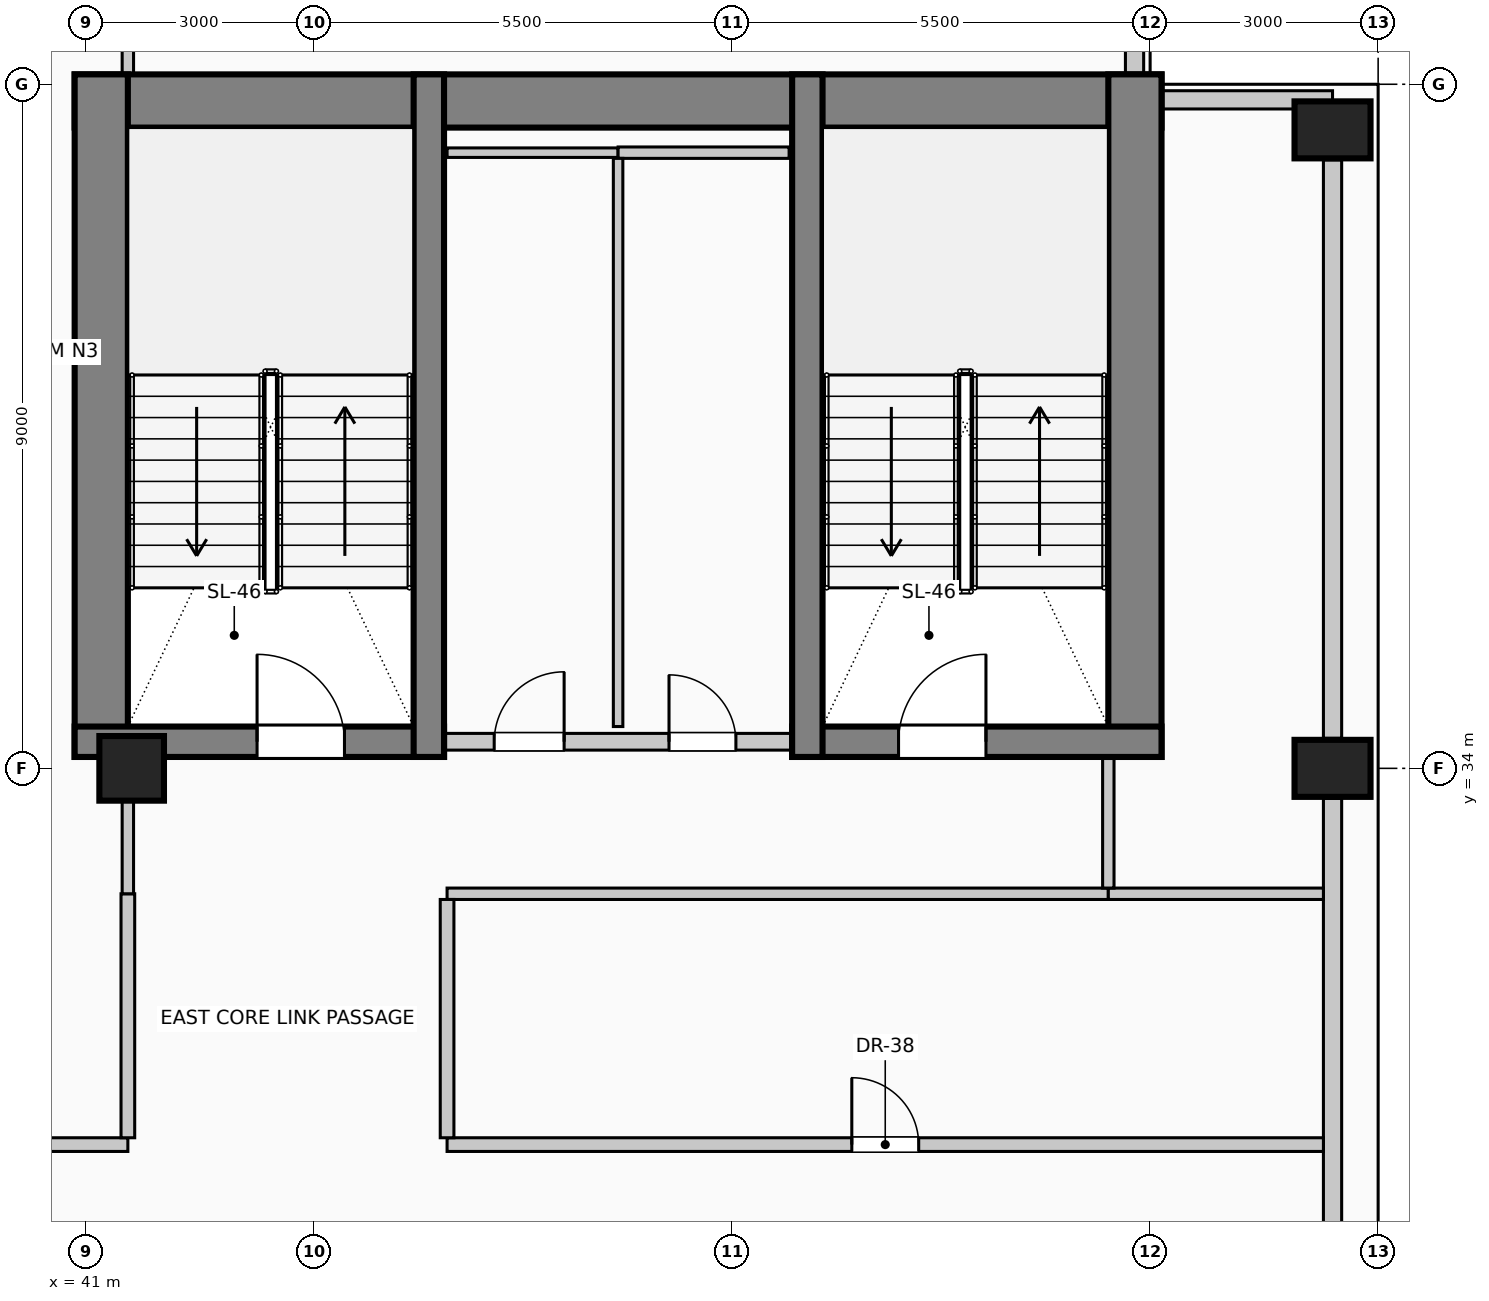
"""IFC4 building model, lengths in metres.
Left out: names, types, materials, properties, quantities, classifications, styles, units other than length and angle.
Written with IfcOpenShell. Run it as: python <this file> out.ifc"""

import sys

from ifc_helpers import new_model, si_unit, direction, frame, frame_2d, origin, origin_2d, place, context, subcontext, project, spatial, rectangle, circle, extrude, element, fill, save


model = new_model("IFC4")
c1 = context("Model", 3, precision=1e-05, world=origin(), true_north=direction((0.0, 1.0)))
c2 = subcontext(c1, "Body", "Model", "MODEL_VIEW")
j1 = project(units=[si_unit("LENGTHUNIT", "METRE"), si_unit("PLANEANGLEUNIT", "RADIAN")], contexts=[c1])
p1 = place(None, origin())
s1 = spatial("IfcSite", under=j1, at=p1, CompositionType="ELEMENT")
p2 = place(p1, origin())
s2 = spatial("IfcBuilding", under=s1, at=p2, CompositionType="ELEMENT")
p3 = place(p2, frame((0.0, 0.0, 260.6)))
s3 = spatial("IfcBuildingStorey", under=s2, at=p3, CompositionType="ELEMENT", Elevation=260.6)
p4 = place(p3, frame((40.85, 42.78, 0.0), z_axis=(0.0, 0.0, 1.0), x_axis=(1.0, 0.0, 0.0)))
e1 = element("IfcWall", 1, at=p4, inside=s3, PredefinedType="SHEAR", context=c2, shape_type="SweptSolid", body=[
    extrude(rectangle(XDim=14.3, YDim=0.7, at=frame_2d((7.15, 0.0))), origin(), (0.0, 0.0, 1.0), 4.0),
])
for number, where, z_axis, x_axis in (
    (2, (41.2, 34.15, 0.0), (0.0, 0.0, 1.0), (0.0, 1.0, 0.0)),
    (3, (54.8, 34.15, 0.0), (0.0, 0.0, 1.0), (0.0, 1.0, 0.0)),
):
    element("IfcWall", number, at=place(p3, frame(where, z_axis=z_axis, x_axis=x_axis)), inside=s3, PredefinedType="SHEAR", context=c2, shape_type="SweptSolid", body=[
        extrude(rectangle(XDim=8.98, YDim=0.7, at=frame_2d((4.49, 0.0))), origin(), (0.0, 0.0, 1.0), 4.0),
    ])
p5 = place(p3, frame((40.85, 34.35, 0.0), z_axis=(0.0, 0.0, 1.0), x_axis=(1.0, 0.0, 0.0)))
e4 = element("IfcWall", 4, at=p5, inside=s3, PredefinedType="SHEAR", context=c2, shape_type="SweptSolid", body=[
    extrude(rectangle(XDim=4.86, YDim=0.4, at=frame_2d((2.43, 0.0))), origin(), (0.0, 0.0, 1.0), 4.0),
])
p6 = place(p5, frame((2.4, 0.0, 0.0)))
e5 = element("IfcOpeningElement", 5, at=p6, cuts=e4, PredefinedType="OPENING", context=c2, shape_type="SweptSolid", body=[
    extrude(rectangle(XDim=1.15, YDim=2.2, at=frame_2d((0.575, 1.1))), frame((0.0, 0.21, 0.0), z_axis=(0.0, -1.0, 0.0), x_axis=(1.0, 0.0, 0.0)), (0.0, 0.0, 1.0), 0.42),
])
p7 = place(p3, frame((45.51, 34.15, 0.0), z_axis=(0.0, 0.0, 1.0), x_axis=(0.0, 1.0, 0.0)))
e6 = element("IfcWall", 6, at=p7, inside=s3, PredefinedType="SHEAR", context=c2, shape_type="SweptSolid", body=[
    extrude(rectangle(XDim=8.98, YDim=0.4, at=frame_2d((4.49, 0.0))), origin(), (0.0, 0.0, 1.0), 4.0),
])
p8 = place(p3, frame((50.29, 34.35, 0.0), z_axis=(0.0, 0.0, 1.0), x_axis=(1.0, 0.0, 0.0)))
e7 = element("IfcWall", 7, at=p8, inside=s3, PredefinedType="SHEAR", context=c2, shape_type="SweptSolid", body=[
    extrude(rectangle(XDim=4.86, YDim=0.4, at=frame_2d((2.43, 0.0))), origin(), (0.0, 0.0, 1.0), 4.0),
])
p9 = place(p8, frame((1.4, 0.0, 0.0)))
e8 = element("IfcOpeningElement", 8, at=p9, cuts=e7, PredefinedType="OPENING", context=c2, shape_type="SweptSolid", body=[
    extrude(rectangle(XDim=1.15, YDim=2.2, at=frame_2d((0.575, 1.1))), frame((0.0, 0.21, 0.0), z_axis=(0.0, -1.0, 0.0), x_axis=(1.0, 0.0, 0.0)), (0.0, 0.0, 1.0), 0.42),
])
p10 = place(p3, frame((50.49, 34.15, 0.0), z_axis=(0.0, 0.0, 1.0), x_axis=(0.0, 1.0, 0.0)))
e9 = element("IfcWall", 9, at=p10, inside=s3, PredefinedType="SHEAR", context=c2, shape_type="SweptSolid", body=[
    extrude(rectangle(XDim=8.98, YDim=0.4, at=frame_2d((4.49, 0.0))), origin(), (0.0, 0.0, 1.0), 4.0),
])
for number, where, z_axis, x_axis in (
    (10, (57.4, 34.0, 0.0), (0.0, 0.0, 1.0), (0.0, 1.0, 0.0)),
    (11, (57.4, 42.4, 0.0), (0.0, 0.0, 1.0), (0.0, 1.0, 0.0)),
):
    element("IfcColumn", number, at=place(p3, frame(where, z_axis=z_axis, x_axis=x_axis)), inside=s3, PredefinedType="COLUMN", context=c2, shape_type="SweptSolid", body=[
        extrude(rectangle(XDim=0.75, YDim=1.0, at=origin_2d()), origin(), (0.0, 0.0, 1.0), 4.0),
    ])
p11 = place(p3, frame((41.6, 34.0, 0.0), z_axis=(0.0, 0.0, 1.0), x_axis=(1.0, 0.0, 0.0)))
e12 = element("IfcColumn", 12, at=p11, inside=s3, PredefinedType="COLUMN", context=c2, shape_type="SweptSolid", body=[
    extrude(circle(Radius=0.425, at=origin_2d()), origin(), (0.0, 0.0, 1.0), 4.0),
])
p12 = place(p3, frame((57.4, 33.605, 0.0), z_axis=(0.0, 0.0, 1.0), x_axis=(0.0, -1.0, 0.0)))
e13 = element("IfcWall", 13, at=p12, inside=s3, PredefinedType="SOLIDWALL", context=c2, shape_type="SweptSolid", body=[
    extrude(rectangle(XDim=7.21, YDim=0.24, at=frame_2d((3.605, 0.0))), origin(), (0.0, 0.0, 1.0), 3.0),
])
p13 = place(p3, frame((57.4, 42.005, 0.0), z_axis=(0.0, 0.0, 1.0), x_axis=(0.0, -1.0, 0.0)))
e14 = element("IfcWall", 14, at=p13, inside=s3, PredefinedType="SOLIDWALL", context=c2, shape_type="SweptSolid", body=[
    extrude(rectangle(XDim=7.61, YDim=0.24, at=frame_2d((3.805, 0.0))), origin(), (0.0, 0.0, 1.0), 3.0),
])
p14 = place(p3, frame((54.795, 45.4, 0.0), z_axis=(0.0, 0.0, 1.0), x_axis=(0.0, -1.0, 0.0)))
e15 = element("IfcWall", 15, at=p14, inside=s3, PredefinedType="SOLIDWALL", context=c2, shape_type="SweptSolid", body=[
    extrude(rectangle(XDim=2.265, YDim=0.24, at=frame_2d((1.132, 0.0))), origin(), (0.0, 0.0, 1.0), 3.75),
])
p15 = place(p3, frame((55.155, 42.795, 0.0), z_axis=(0.0, 0.0, 1.0), x_axis=(1.0, 0.0, 0.0)))
e16 = element("IfcWall", 16, at=p15, inside=s3, PredefinedType="SOLIDWALL", context=c2, shape_type="SweptSolid", body=[
    extrude(rectangle(XDim=2.245, YDim=0.24, at=frame_2d((1.123, 0.0))), origin(), (0.0, 0.0, 1.0), 3.75),
])
p16 = place(p3, frame((45.72, 34.35, 0.0), z_axis=(0.0, 0.0, 1.0), x_axis=(1.0, 0.0, 0.0)))
e17 = element("IfcWall", 17, at=p16, inside=s3, PredefinedType="PARTITIONING", context=c2, shape_type="SweptSolid", body=[
    extrude(rectangle(XDim=4.56, YDim=0.22, at=frame_2d((2.28, 0.0))), origin(), (0.0, 0.0, 1.0), 3.75),
])
p17 = place(p16, frame((0.65, 0.0, 0.0)))
e18 = element("IfcOpeningElement", 18, at=p17, cuts=e17, PredefinedType="OPENING", context=c2, shape_type="SweptSolid", body=[
    extrude(rectangle(XDim=0.92, YDim=2.1, at=frame_2d((0.46, 1.05))), frame((0.0, 0.12, 0.0), z_axis=(0.0, -1.0, 0.0), x_axis=(1.0, 0.0, 0.0)), (0.0, 0.0, 1.0), 0.24),
])
p18 = place(p16, frame((2.95, 0.0, 0.0)))
e19 = element("IfcOpeningElement", 19, at=p18, cuts=e17, PredefinedType="OPENING", context=c2, shape_type="SweptSolid", body=[
    extrude(rectangle(XDim=0.88, YDim=2.1, at=frame_2d((0.44, 1.05))), frame((0.0, 0.12, 0.0), z_axis=(0.0, -1.0, 0.0), x_axis=(1.0, 0.0, 0.0)), (0.0, 0.0, 1.0), 0.24),
])
p19 = place(p3, frame((34.42, 29.05, 0.0), z_axis=(0.0, 0.0, 1.0), x_axis=(1.0, 0.0, 0.0)))
e20 = element("IfcWall", 20, at=p19, inside=s3, PredefinedType="PARTITIONING", context=c2, shape_type="SweptSolid", body=[
    extrude(rectangle(XDim=7.13, YDim=0.18, at=frame_2d((3.565, 0.0))), origin(), (0.0, 0.0, 1.0), 3.75),
])
p20 = place(p19, frame((3.09, 0.0, 0.0)))
e21 = element("IfcOpeningElement", 21, at=p20, cuts=e20, PredefinedType="OPENING", context=c2, shape_type="SweptSolid", body=[
    extrude(rectangle(XDim=0.95, YDim=2.15, at=frame_2d((0.475, 1.075))), frame((0.0, 0.1, 0.0), z_axis=(0.0, -1.0, 0.0), x_axis=(1.0, 0.0, 0.0)), (0.0, 0.0, 1.0), 0.2),
])
p21 = place(p3, frame((45.75, 29.05, 0.0), z_axis=(0.0, 0.0, 1.0), x_axis=(1.0, 0.0, 0.0)))
e22 = element("IfcWall", 22, at=p21, inside=s3, PredefinedType="PARTITIONING", context=c2, shape_type="SweptSolid", body=[
    extrude(rectangle(XDim=11.53, YDim=0.18, at=frame_2d((5.765, 0.0))), origin(), (0.0, 0.0, 1.0), 3.75),
])
p22 = place(p21, frame((5.325, 0.0, 0.0)))
e23 = element("IfcOpeningElement", 23, at=p22, cuts=e22, PredefinedType="OPENING", context=c2, shape_type="SweptSolid", body=[
    extrude(rectangle(XDim=0.88, YDim=2.1, at=frame_2d((0.44, 1.05))), frame((0.0, 0.1, 0.0), z_axis=(0.0, -1.0, 0.0), x_axis=(1.0, 0.0, 0.0)), (0.0, 0.0, 1.0), 0.2),
])
p23 = place(p3, frame((45.75, 32.35, 0.0), z_axis=(0.0, 0.0, 1.0), x_axis=(1.0, 0.0, 0.0)))
e24 = element("IfcWall", 24, at=p23, inside=s3, PredefinedType="PARTITIONING", context=c2, shape_type="SweptSolid", body=[
    extrude(rectangle(XDim=8.7, YDim=0.15, at=frame_2d((4.35, 0.0))), origin(), (0.0, 0.0, 1.0), 3.75),
])
p24 = place(p3, frame((54.45, 32.35, 0.0), z_axis=(0.0, 0.0, 1.0), x_axis=(1.0, 0.0, 0.0)))
e25 = element("IfcWall", 25, at=p24, inside=s3, PredefinedType="PARTITIONING", context=c2, shape_type="SweptSolid", body=[
    extrude(rectangle(XDim=2.83, YDim=0.15, at=frame_2d((1.415, 0.0))), origin(), (0.0, 0.0, 1.0), 3.75),
])
p25 = place(p3, frame((45.75, 42.1, 0.0), z_axis=(0.0, 0.0, 1.0), x_axis=(1.0, 0.0, 0.0)))
e26 = element("IfcWall", 26, at=p25, inside=s3, PredefinedType="PARTITIONING", context=c2, shape_type="SweptSolid", body=[
    extrude(rectangle(XDim=2.25, YDim=0.125, at=frame_2d((1.125, 0.0))), origin(), (0.0, 0.0, 1.0), 3.75),
])
p26 = place(p3, frame((48.0, 42.1, 0.0), z_axis=(0.0, 0.0, 1.0), x_axis=(1.0, 0.0, 0.0)))
e27 = element("IfcWall", 27, at=p26, inside=s3, PredefinedType="PARTITIONING", context=c2, shape_type="SweptSolid", body=[
    extrude(rectangle(XDim=2.25, YDim=0.15, at=frame_2d((1.125, 0.0))), origin(), (0.0, 0.0, 1.0), 3.75),
])
p27 = place(p3, frame((41.55, 29.14, 0.0), z_axis=(0.0, 0.0, 1.0), x_axis=(0.0, 1.0, 0.0)))
e28 = element("IfcWall", 28, at=p27, inside=s3, PredefinedType="PARTITIONING", context=c2, shape_type="SweptSolid", body=[
    extrude(rectangle(XDim=3.21, YDim=0.18, at=frame_2d((1.605, 0.0))), origin(), (0.0, 0.0, 1.0), 3.195),
])
p28 = place(p3, frame((41.55, 32.35, 0.0), z_axis=(0.0, 0.0, 1.0), x_axis=(0.0, 1.0, 0.0)))
e29 = element("IfcWall", 29, at=p28, inside=s3, PredefinedType="PARTITIONING", context=c2, shape_type="SweptSolid", body=[
    extrude(rectangle(XDim=1.225, YDim=0.15, at=frame_2d((0.612, 0.0))), origin(), (0.0, 0.0, 1.0), 3.195),
])
p29 = place(p3, frame((41.55, 43.13, 0.0), z_axis=(0.0, 0.0, 1.0), x_axis=(0.0, 1.0, 0.0)))
e30 = element("IfcWall", 30, at=p29, inside=s3, PredefinedType="PARTITIONING", context=c2, shape_type="SweptSolid", body=[
    extrude(rectangle(XDim=1.62, YDim=0.15, at=frame_2d((0.81, 0.0))), origin(), (0.0, 0.0, 1.0), 3.75),
])
p30 = place(p3, frame((45.75, 29.14, 0.0), z_axis=(0.0, 0.0, 1.0), x_axis=(0.0, 1.0, 0.0)))
e31 = element("IfcWall", 31, at=p30, inside=s3, PredefinedType="PARTITIONING", context=c2, shape_type="SweptSolid", body=[
    extrude(rectangle(XDim=3.135, YDim=0.18, at=frame_2d((1.567, 0.0))), origin(), (0.0, 0.0, 1.0), 3.75),
])
p31 = place(p3, frame((48.0, 34.55, 0.0), z_axis=(0.0, 0.0, 1.0), x_axis=(0.0, 1.0, 0.0)))
e32 = element("IfcWall", 32, at=p31, inside=s3, PredefinedType="PARTITIONING", context=c2, shape_type="SweptSolid", body=[
    extrude(rectangle(XDim=7.475, YDim=0.125, at=frame_2d((3.737, 0.0))), origin(), (0.0, 0.0, 1.0), 3.75),
])
p32 = place(p3, frame((54.45, 32.425, 0.0), z_axis=(0.0, 0.0, 1.0), x_axis=(0.0, 1.0, 0.0)))
e33 = element("IfcWall", 33, at=p32, inside=s3, PredefinedType="PARTITIONING", context=c2, shape_type="SweptSolid", body=[
    extrude(rectangle(XDim=1.725, YDim=0.15, at=frame_2d((0.862, 0.0))), origin(), (0.0, 0.0, 1.0), 3.75),
])
p33 = place(p6, origin())
e34 = element("IfcDoor", 34, at=p33, inside=s3, OperationType="SINGLE_SWING_LEFT", PredefinedType="DOOR", context=c2, shape_type="SweptSolid", body=[
    extrude(rectangle(XDim=1.15, YDim=2.2, at=frame_2d((0.575, 1.1))), frame((0.0, 0.025, 0.0), z_axis=(0.0, -1.0, 0.0), x_axis=(1.0, 0.0, 0.0)), (0.0, 0.0, 1.0), 0.05),
])
fill(e5, e34)
p34 = place(p17, origin())
e35 = element("IfcDoor", 35, at=p34, inside=s3, OperationType="SINGLE_SWING_RIGHT", PredefinedType="DOOR", context=c2, shape_type="SweptSolid", body=[
    extrude(rectangle(XDim=0.92, YDim=2.1, at=frame_2d((0.46, 1.05))), frame((0.0, 0.025, 0.0), z_axis=(0.0, -1.0, 0.0), x_axis=(1.0, 0.0, 0.0)), (0.0, 0.0, 1.0), 0.05),
])
fill(e18, e35)
p35 = place(p18, origin())
e36 = element("IfcDoor", 36, at=p35, inside=s3, OperationType="SINGLE_SWING_LEFT", PredefinedType="DOOR", context=c2, shape_type="SweptSolid", body=[
    extrude(rectangle(XDim=0.88, YDim=2.1, at=frame_2d((0.44, 1.05))), frame((0.0, 0.025, 0.0), z_axis=(0.0, -1.0, 0.0), x_axis=(1.0, 0.0, 0.0)), (0.0, 0.0, 1.0), 0.05),
])
fill(e19, e36)
p36 = place(p9, origin())
e37 = element("IfcDoor", 37, at=p36, inside=s3, OperationType="SINGLE_SWING_RIGHT", PredefinedType="DOOR", context=c2, shape_type="SweptSolid", body=[
    extrude(rectangle(XDim=1.15, YDim=2.2, at=frame_2d((0.575, 1.1))), frame((0.0, 0.025, 0.0), z_axis=(0.0, -1.0, 0.0), x_axis=(1.0, 0.0, 0.0)), (0.0, 0.0, 1.0), 0.05),
])
fill(e8, e37)
p37 = place(p22, origin())
e38 = element("IfcDoor", 38, at=p37, inside=s3, OperationType="SINGLE_SWING_LEFT", PredefinedType="DOOR", context=c2, shape_type="SweptSolid", body=[
    extrude(rectangle(XDim=0.88, YDim=2.1, at=frame_2d((0.44, 1.05))), frame((0.0, 0.025, 0.0), z_axis=(0.0, -1.0, 0.0), x_axis=(1.0, 0.0, 0.0)), (0.0, 0.0, 1.0), 0.05),
])
fill(e23, e38)
save(model, sys.argv[1])
